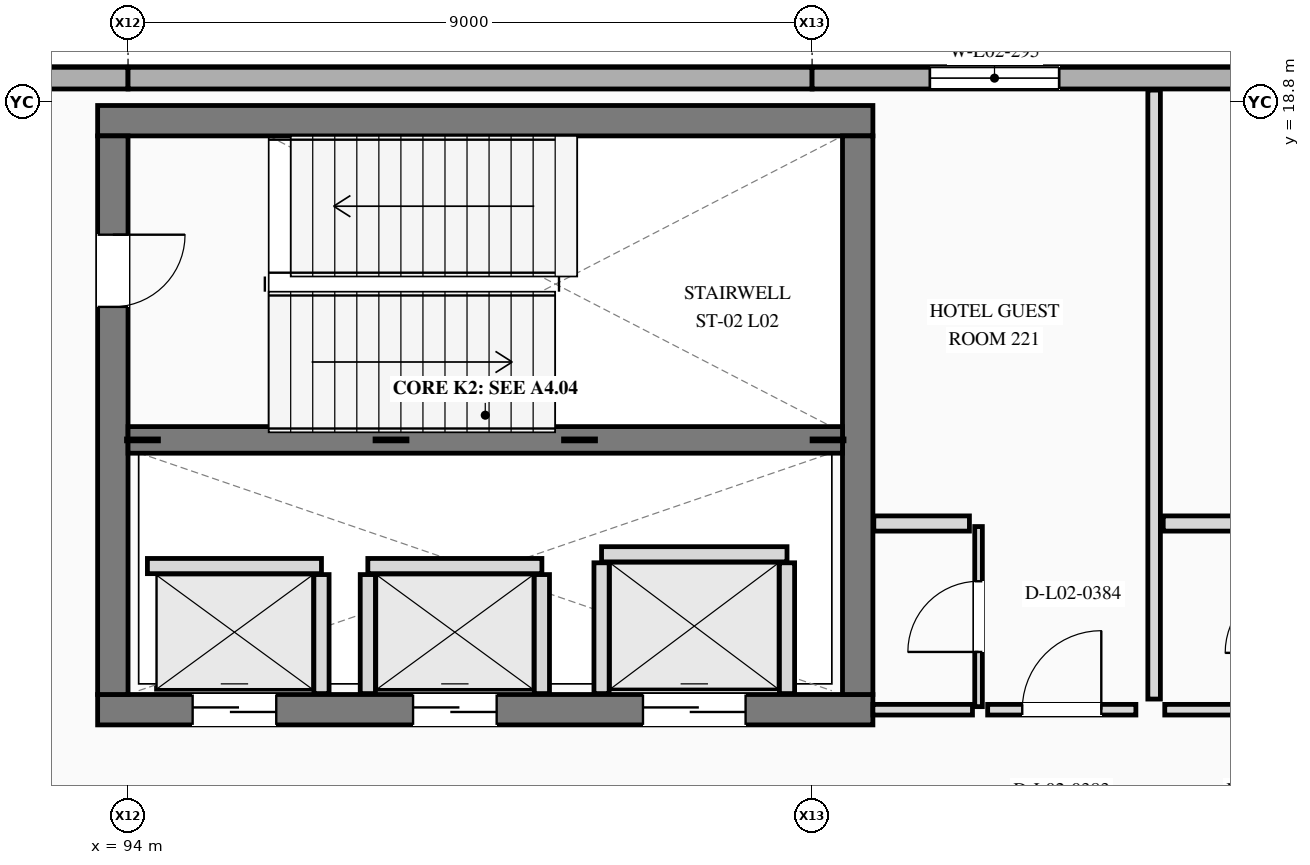
"""IFC4 building model, lengths in metres.
Left out: names, types, materials, properties, quantities, classifications, styles, units other than length and angle.
Written with IfcOpenShell. Run it as: python <this file> out.ifc"""

import sys

from ifc_helpers import new_model, si_unit, direction, frame, frame_2d, origin, place, context, subcontext, project, spatial, rectangle, extrude, element, fill, save


model = new_model("IFC4")
c1 = context("Model", 3, precision=1e-05, world=origin(), true_north=direction((0.0, 1.0)))
c2 = subcontext(c1, "Body", "Model", "MODEL_VIEW")
j1 = project(units=[si_unit("LENGTHUNIT", "METRE"), si_unit("PLANEANGLEUNIT", "RADIAN")], contexts=[c1])
p1 = place(None, origin())
s1 = spatial("IfcSite", under=j1, at=p1, CompositionType="ELEMENT")
p2 = place(p1, origin())
s2 = spatial("IfcBuilding", under=s1, at=p2, CompositionType="ELEMENT")
p3 = place(p2, frame((0.0, 0.0, 10.8)))
s3 = spatial("IfcBuildingStorey", under=s2, at=p3, CompositionType="ELEMENT", Elevation=10.8)
for number, where, z_axis, x_axis in (
    (1, (94.0, 19.11, 0.0), (0.0, 0.0, 1.0), (-1.0, 0.0, 0.0)),
    (2, (103.0, 19.11, 0.0), (0.0, 0.0, 1.0), (-1.0, 0.0, 0.0)),
):
    element("IfcWall", number, at=place(p3, frame(where, z_axis=z_axis, x_axis=x_axis)), inside=s3, PredefinedType="STANDARD", context=c2, shape_type="SweptSolid", body=[
        extrude(rectangle(XDim=9.0, YDim=0.285, at=frame_2d((4.5, 0.0))), origin(), (0.0, 0.0, 1.0), 4.8),
    ])
p4 = place(p3, frame((112.0, 19.11, 0.0), z_axis=(0.0, 0.0, 1.0), x_axis=(-1.0, 0.0, 0.0)))
e3 = element("IfcWall", 3, at=p4, inside=s3, PredefinedType="STANDARD", context=c2, shape_type="SweptSolid", body=[
    extrude(rectangle(XDim=9.0, YDim=0.285, at=frame_2d((4.5, 0.0))), origin(), (0.0, 0.0, 1.0), 4.8),
])
p5 = place(p4, frame((5.75, 0.0, 0.85)))
e4 = element("IfcOpeningElement", 4, at=p5, cuts=e3, PredefinedType="OPENING", context=c2, shape_type="SweptSolid", body=[
    extrude(rectangle(XDim=1.7, YDim=1.6, at=frame_2d((0.85, 0.8))), frame((0.0, 0.152, 0.0), z_axis=(0.0, -1.0, 0.0), x_axis=(1.0, 0.0, 0.0)), (0.0, 0.0, 1.0), 0.305),
])
p6 = place(p4, frame((1.7, 0.0, 0.85)))
e5 = element("IfcOpeningElement", 5, at=p6, cuts=e3, PredefinedType="OPENING", context=c2, shape_type="SweptSolid", body=[
    extrude(rectangle(XDim=1.4, YDim=1.55, at=frame_2d((0.7, 0.775))), frame((0.0, 0.152, 0.0), z_axis=(0.0, -1.0, 0.0), x_axis=(1.0, 0.0, 0.0)), (0.0, 0.0, 1.0), 0.305),
])
p7 = place(p3, frame((93.6, 10.8, 0.0), z_axis=(0.0, 0.0, 1.0), x_axis=(1.0, 0.0, 0.0)))
e6 = element("IfcWall", 6, at=p7, inside=s3, PredefinedType="SHEAR", context=c2, shape_type="SweptSolid", body=[
    extrude(rectangle(XDim=10.2, YDim=0.4, at=frame_2d((5.1, 0.0))), origin(), (0.0, 0.0, 1.0), 4.8),
])
p8 = place(p7, frame((1.25, 0.0, 0.0)))
e7 = element("IfcOpeningElement", 7, at=p8, cuts=e6, PredefinedType="OPENING", context=c2, shape_type="SweptSolid", body=[
    extrude(rectangle(XDim=1.1, YDim=2.2, at=frame_2d((0.55, 1.1))), frame((0.0, 0.21, 0.0), z_axis=(0.0, -1.0, 0.0), x_axis=(1.0, 0.0, 0.0)), (0.0, 0.0, 1.0), 0.42),
])
p9 = place(p7, frame((4.15, 0.0, 0.0)))
e8 = element("IfcOpeningElement", 8, at=p9, cuts=e6, PredefinedType="OPENING", context=c2, shape_type="SweptSolid", body=[
    extrude(rectangle(XDim=1.1, YDim=2.2, at=frame_2d((0.55, 1.1))), frame((0.0, 0.21, 0.0), z_axis=(0.0, -1.0, 0.0), x_axis=(1.0, 0.0, 0.0)), (0.0, 0.0, 1.0), 0.42),
])
p10 = place(p7, frame((7.175, 0.0, 0.0)))
e9 = element("IfcOpeningElement", 9, at=p10, cuts=e6, PredefinedType="OPENING", context=c2, shape_type="SweptSolid", body=[
    extrude(rectangle(XDim=1.35, YDim=2.3, at=frame_2d((0.675, 1.15))), frame((0.0, 0.21, 0.0), z_axis=(0.0, -1.0, 0.0), x_axis=(1.0, 0.0, 0.0)), (0.0, 0.0, 1.0), 0.42),
])
p11 = place(p3, frame((103.8, 18.55, 0.0), z_axis=(0.0, 0.0, 1.0), x_axis=(-1.0, 0.0, 0.0)))
e10 = element("IfcWall", 10, at=p11, inside=s3, PredefinedType="SHEAR", context=c2, shape_type="SweptSolid", body=[
    extrude(rectangle(XDim=10.2, YDim=0.4, at=frame_2d((5.1, 0.0))), origin(), (0.0, 0.0, 1.0), 4.8),
])
p12 = place(p3, frame((93.8, 18.35, 0.0), z_axis=(0.0, 0.0, 1.0), x_axis=(0.0, -1.0, 0.0)))
e11 = element("IfcWall", 11, at=p12, inside=s3, PredefinedType="SHEAR", context=c2, shape_type="SweptSolid", body=[
    extrude(rectangle(XDim=7.35, YDim=0.4, at=frame_2d((3.675, 0.0))), origin(), (0.0, 0.0, 1.0), 4.8),
])
p13 = place(p12, frame((1.3, 0.0, 0.0)))
e12 = element("IfcOpeningElement", 12, at=p13, cuts=e11, PredefinedType="OPENING", context=c2, shape_type="SweptSolid", body=[
    extrude(rectangle(XDim=0.95, YDim=2.2, at=frame_2d((0.475, 1.1))), frame((0.0, 0.21, 0.0), z_axis=(0.0, -1.0, 0.0), x_axis=(1.0, 0.0, 0.0)), (0.0, 0.0, 1.0), 0.42),
])
p14 = place(p3, frame((103.6, 11.0, 0.0), z_axis=(0.0, 0.0, 1.0), x_axis=(0.0, 1.0, 0.0)))
e13 = element("IfcWall", 13, at=p14, inside=s3, PredefinedType="SHEAR", context=c2, shape_type="SweptSolid", body=[
    extrude(rectangle(XDim=7.35, YDim=0.4, at=frame_2d((3.675, 0.0))), origin(), (0.0, 0.0, 1.0), 4.8),
])
p15 = place(p3, frame((94.0, 14.35, 0.0), z_axis=(0.0, 0.0, 1.0), x_axis=(1.0, 0.0, 0.0)))
e14 = element("IfcWall", 14, at=p15, inside=s3, PredefinedType="SHEAR", context=c2, shape_type="SweptSolid", body=[
    extrude(rectangle(XDim=9.4, YDim=0.35, at=frame_2d((4.7, 0.0))), origin(), (0.0, 0.0, 1.0), 4.8),
])
p16 = place(p3, frame((94.255, 12.69, 0.0), z_axis=(0.0, 0.0, 1.0), x_axis=(1.0, 0.0, 0.0)))
e15 = element("IfcWall", 15, at=p16, inside=s3, PredefinedType="PLUMBINGWALL", context=c2, shape_type="SweptSolid", body=[
    extrude(rectangle(XDim=2.29, YDim=0.2, at=frame_2d((1.145, 0.0))), origin(), (0.0, 0.0, 1.0), 4.475),
])
p17 = place(p3, frame((96.545, 11.012, 0.0), z_axis=(0.0, 0.0, 1.0), x_axis=(0.0, 1.0, 0.0)))
e16 = element("IfcWall", 16, at=p17, inside=s3, PredefinedType="PLUMBINGWALL", context=c2, shape_type="SweptSolid", body=[
    extrude(rectangle(XDim=1.566, YDim=0.2, at=frame_2d((0.783, 0.0))), origin(), (0.0, 0.0, 1.0), 4.475),
])
p18 = place(p3, frame((97.155, 12.69, 0.0), z_axis=(0.0, 0.0, 1.0), x_axis=(1.0, 0.0, 0.0)))
e17 = element("IfcWall", 17, at=p18, inside=s3, PredefinedType="PLUMBINGWALL", context=c2, shape_type="SweptSolid", body=[
    extrude(rectangle(XDim=2.29, YDim=0.2, at=frame_2d((1.145, 0.0))), origin(), (0.0, 0.0, 1.0), 4.475),
])
for number, where, z_axis, x_axis in (
    (18, (97.155, 11.012, 0.0), (0.0, 0.0, 1.0), (0.0, 1.0, 0.0)),
    (19, (99.445, 11.012, 0.0), (0.0, 0.0, 1.0), (0.0, 1.0, 0.0)),
):
    element("IfcWall", number, at=place(p3, frame(where, z_axis=z_axis, x_axis=x_axis)), inside=s3, PredefinedType="PLUMBINGWALL", context=c2, shape_type="SweptSolid", body=[
        extrude(rectangle(XDim=1.566, YDim=0.2, at=frame_2d((0.783, 0.0))), origin(), (0.0, 0.0, 1.0), 4.475),
    ])
p19 = place(p3, frame((100.23, 12.845, 0.0), z_axis=(0.0, 0.0, 1.0), x_axis=(1.0, 0.0, 0.0)))
e20 = element("IfcWall", 20, at=p19, inside=s3, PredefinedType="PLUMBINGWALL", context=c2, shape_type="SweptSolid", body=[
    extrude(rectangle(XDim=2.44, YDim=0.2, at=frame_2d((1.22, 0.0))), origin(), (0.0, 0.0, 1.0), 4.475),
])
for number, where, z_axis, x_axis in (
    (21, (100.23, 11.012, 0.0), (0.0, 0.0, 1.0), (0.0, 1.0, 0.0)),
    (22, (102.67, 11.012, 0.0), (0.0, 0.0, 1.0), (0.0, 1.0, 0.0)),
):
    element("IfcWall", number, at=place(p3, frame(where, z_axis=z_axis, x_axis=x_axis)), inside=s3, PredefinedType="PLUMBINGWALL", context=c2, shape_type="SweptSolid", body=[
        extrude(rectangle(XDim=1.721, YDim=0.2, at=frame_2d((0.86, 0.0))), origin(), (0.0, 0.0, 1.0), 4.475),
    ])
p20 = place(p3, frame((103.8, 10.8, 0.0), z_axis=(0.0, 0.0, 1.0), x_axis=(1.0, 0.0, 0.0)))
e23 = element("IfcWall", 23, at=p20, inside=s3, PredefinedType="PARTITIONING", context=c2, shape_type="SweptSolid", body=[
    extrude(rectangle(XDim=1.31, YDim=0.14, at=frame_2d((0.655, 0.0))), origin(), (0.0, 0.0, 1.0), 4.475),
])
p21 = place(p3, frame((105.31, 10.8, 0.0), z_axis=(0.0, 0.0, 1.0), x_axis=(1.0, 0.0, 0.0)))
e24 = element("IfcWall", 24, at=p21, inside=s3, PredefinedType="PARTITIONING", context=c2, shape_type="SweptSolid", body=[
    extrude(rectangle(XDim=1.95, YDim=0.14, at=frame_2d((0.975, 0.0))), origin(), (0.0, 0.0, 1.0), 4.475),
])
p22 = place(p21, frame((0.455, 0.0, 0.0)))
e25 = element("IfcOpeningElement", 25, at=p22, cuts=e24, PredefinedType="OPENING", context=c2, shape_type="SweptSolid", body=[
    extrude(rectangle(XDim=1.04, YDim=2.4, at=frame_2d((0.52, 1.2))), frame((0.0, 0.08, 0.0), z_axis=(0.0, -1.0, 0.0), x_axis=(1.0, 0.0, 0.0)), (0.0, 0.0, 1.0), 0.16),
])
p23 = place(p3, frame((107.5, 10.94, 0.0), z_axis=(0.0, 0.0, 1.0), x_axis=(0.0, 1.0, 0.0)))
e26 = element("IfcWall", 26, at=p23, inside=s3, PredefinedType="PARTITIONING", context=c2, shape_type="SweptSolid", body=[
    extrude(rectangle(XDim=8.012, YDim=0.165, at=frame_2d((4.006, 0.0))), origin(), (0.0, 0.0, 1.0), 4.475),
])
p24 = place(p3, frame((105.19, 10.84, 0.0), z_axis=(0.0, 0.0, 1.0), x_axis=(0.0, 1.0, 0.0)))
e27 = element("IfcWall", 27, at=p24, inside=s3, PredefinedType="PARTITIONING", context=c2, shape_type="SweptSolid", body=[
    extrude(rectangle(XDim=2.37, YDim=0.1, at=frame_2d((1.185, 0.0))), origin(), (0.0, 0.0, 1.0), 4.475),
])
p25 = place(p24, frame((0.72, 0.0, 0.0)))
e28 = element("IfcOpeningElement", 28, at=p25, cuts=e27, PredefinedType="OPENING", context=c2, shape_type="SweptSolid", body=[
    extrude(rectangle(XDim=0.93, YDim=2.22, at=frame_2d((0.465, 1.11))), frame((0.0, 0.06, 0.0), z_axis=(0.0, -1.0, 0.0), x_axis=(1.0, 0.0, 0.0)), (0.0, 0.0, 1.0), 0.12),
])
p26 = place(p3, frame((103.812, 13.25, 0.0), z_axis=(0.0, 0.0, 1.0), x_axis=(1.0, 0.0, 0.0)))
e29 = element("IfcWall", 29, at=p26, inside=s3, PredefinedType="PLUMBINGWALL", context=c2, shape_type="SweptSolid", body=[
    extrude(rectangle(XDim=1.258, YDim=0.2, at=frame_2d((0.629, 0.0))), origin(), (0.0, 0.0, 1.0), 4.475),
])
p27 = place(p3, frame((107.64, 10.8, 0.0), z_axis=(0.0, 0.0, 1.0), x_axis=(1.0, 0.0, 0.0)))
e30 = element("IfcWall", 30, at=p27, inside=s3, PredefinedType="PARTITIONING", context=c2, shape_type="SweptSolid", body=[
    extrude(rectangle(XDim=1.67, YDim=0.14, at=frame_2d((0.835, 0.0))), origin(), (0.0, 0.0, 1.0), 4.475),
])
p28 = place(p3, frame((107.62, 13.25, 0.0), z_axis=(0.0, 0.0, 1.0), x_axis=(1.0, 0.0, 0.0)))
e31 = element("IfcWall", 31, at=p28, inside=s3, PredefinedType="PLUMBINGWALL", context=c2, shape_type="SweptSolid", body=[
    extrude(rectangle(XDim=1.65, YDim=0.2, at=frame_2d((0.825, 0.0))), origin(), (0.0, 0.0, 1.0), 4.475),
])
p29 = place(p5, origin())
e32 = element("IfcWindow", 32, at=p29, inside=s3, PartitioningType="SINGLE_PANEL", PredefinedType="WINDOW", context=c2, shape_type="SweptSolid", body=[
    extrude(rectangle(XDim=1.7, YDim=1.6, at=frame_2d((0.85, 0.8))), frame((0.0, 0.03, 0.0), z_axis=(0.0, -1.0, 0.0), x_axis=(1.0, 0.0, 0.0)), (0.0, 0.0, 1.0), 0.06),
])
fill(e4, e32)
p30 = place(p13, origin())
e33 = element("IfcDoor", 33, at=p30, inside=s3, OperationType="SINGLE_SWING_LEFT", PredefinedType="DOOR", context=c2, shape_type="SweptSolid", body=[
    extrude(rectangle(XDim=0.95, YDim=2.2, at=frame_2d((0.475, 1.1))), frame((0.0, 0.025, 0.0), z_axis=(0.0, -1.0, 0.0), x_axis=(1.0, 0.0, 0.0)), (0.0, 0.0, 1.0), 0.05),
])
fill(e12, e33)
p31 = place(p8, origin())
e34 = element("IfcDoor", 34, at=p31, inside=s3, OperationType="SLIDING_TO_LEFT", PredefinedType="DOOR", context=c2, shape_type="SweptSolid", body=[
    extrude(rectangle(XDim=1.1, YDim=2.2, at=frame_2d((0.55, 1.1))), frame((0.0, 0.025, 0.0), z_axis=(0.0, -1.0, 0.0), x_axis=(1.0, 0.0, 0.0)), (0.0, 0.0, 1.0), 0.05),
])
fill(e7, e34)
p32 = place(p9, origin())
e35 = element("IfcDoor", 35, at=p32, inside=s3, OperationType="SLIDING_TO_RIGHT", PredefinedType="DOOR", context=c2, shape_type="SweptSolid", body=[
    extrude(rectangle(XDim=1.1, YDim=2.2, at=frame_2d((0.55, 1.1))), frame((0.0, 0.025, 0.0), z_axis=(0.0, -1.0, 0.0), x_axis=(1.0, 0.0, 0.0)), (0.0, 0.0, 1.0), 0.05),
])
fill(e8, e35)
p33 = place(p10, origin())
e36 = element("IfcDoor", 36, at=p33, inside=s3, OperationType="SLIDING_TO_LEFT", PredefinedType="DOOR", context=c2, shape_type="SweptSolid", body=[
    extrude(rectangle(XDim=1.35, YDim=2.3, at=frame_2d((0.675, 1.15))), frame((0.0, 0.025, 0.0), z_axis=(0.0, -1.0, 0.0), x_axis=(1.0, 0.0, 0.0)), (0.0, 0.0, 1.0), 0.05),
])
fill(e9, e36)
p34 = place(p22, origin())
e37 = element("IfcDoor", 37, at=p34, inside=s3, OperationType="SINGLE_SWING_RIGHT", PredefinedType="DOOR", context=c2, shape_type="SweptSolid", body=[
    extrude(rectangle(XDim=1.04, YDim=2.4, at=frame_2d((0.52, 1.2))), frame((0.0, 0.025, 0.0), z_axis=(0.0, -1.0, 0.0), x_axis=(1.0, 0.0, 0.0)), (0.0, 0.0, 1.0), 0.05),
])
fill(e25, e37)
p35 = place(p25, origin())
e38 = element("IfcDoor", 38, at=p35, inside=s3, OperationType="SINGLE_SWING_LEFT", PredefinedType="DOOR", context=c2, shape_type="SweptSolid", body=[
    extrude(rectangle(XDim=0.93, YDim=2.22, at=frame_2d((0.465, 1.11))), frame((0.0, 0.025, 0.0), z_axis=(0.0, -1.0, 0.0), x_axis=(1.0, 0.0, 0.0)), (0.0, 0.0, 1.0), 0.05),
])
fill(e28, e38)
save(model, sys.argv[1])
